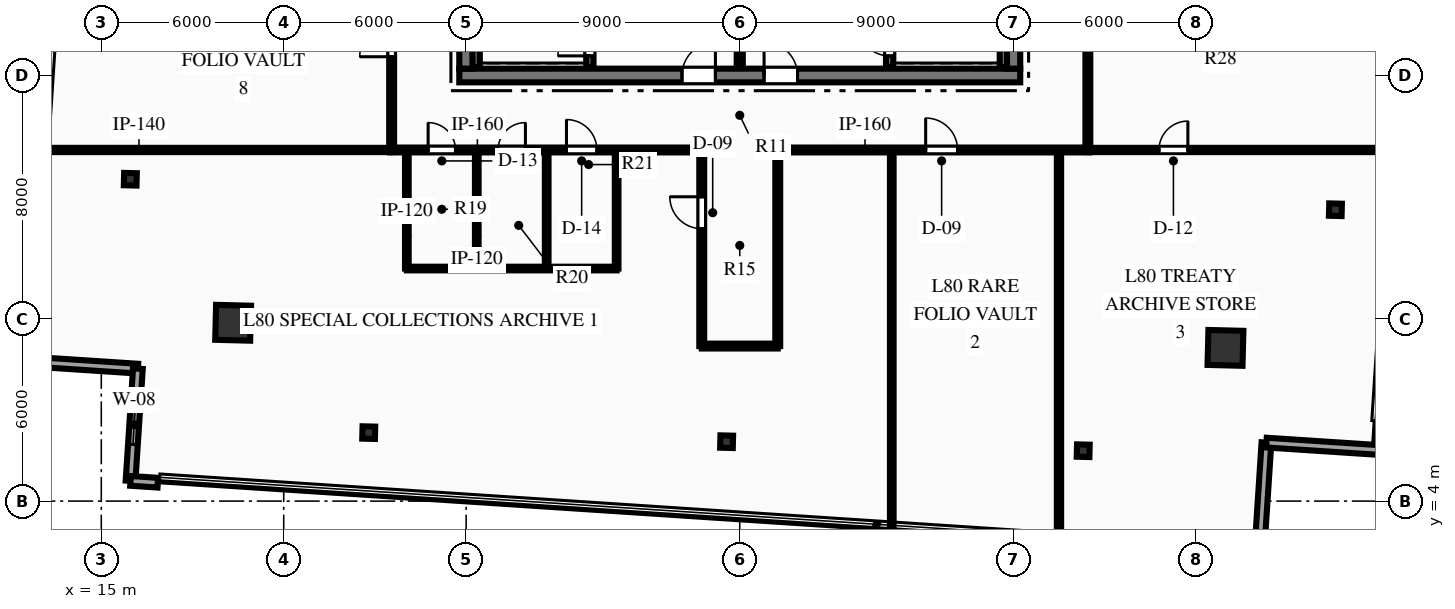
"""IFC4 building model, lengths in metres.
Left out: names, types, materials, properties, quantities, classifications, styles, units other than length and angle.
Written with IfcOpenShell. Run it as: python <this file> out.ifc"""

import sys

from ifc_helpers import new_model, si_unit, direction, frame, frame_2d, origin, origin_2d, place, context, subcontext, project, spatial, rectangle, hollow_rectangle, i_section, extrude, element, fill, save


model = new_model("IFC4")
c1 = context("Model", 3, precision=1e-05, world=origin(), true_north=direction((0.0, 1.0)))
c2 = subcontext(c1, "Body", "Model", "MODEL_VIEW")
j1 = project(units=[si_unit("LENGTHUNIT", "METRE"), si_unit("PLANEANGLEUNIT", "RADIAN")], contexts=[c1])
p1 = place(None, origin())
s1 = spatial("IfcSite", under=j1, at=p1, CompositionType="ELEMENT")
p2 = place(p1, origin())
s2 = spatial("IfcBuilding", under=s1, at=p2, CompositionType="ELEMENT")
p3 = place(p2, frame((0.0, 0.0, 317.7)))
s3 = spatial("IfcBuildingStorey", under=s2, at=p3, CompositionType="ELEMENT", Elevation=317.7)
p4 = place(p3, frame((26.775, 18.0, 0.0), z_axis=(0.0, 0.0, 1.0), x_axis=(1.0, 0.0, 0.0)))
e1 = element("IfcWall", 1, at=p4, inside=s3, PredefinedType="SHEAR", context=c2, shape_type="SweptSolid", body=[
    extrude(rectangle(XDim=18.45, YDim=0.45, at=frame_2d((9.225, 0.0))), origin(), (0.0, 0.0, 1.0), 3.75),
])
p5 = place(p4, frame((7.325, 0.0, 0.0)))
e2 = element("IfcOpeningElement", 2, at=p5, cuts=e1, PredefinedType="OPENING", context=c2, shape_type="SweptSolid", body=[
    extrude(rectangle(XDim=1.1, YDim=2.15, at=frame_2d((0.55, 1.075))), frame((0.0, 0.235, 0.0), z_axis=(0.0, -1.0, 0.0), x_axis=(1.0, 0.0, 0.0)), (0.0, 0.0, 1.0), 0.47),
])
p6 = place(p4, frame((10.025, 0.0, 0.0)))
e3 = element("IfcOpeningElement", 3, at=p6, cuts=e1, PredefinedType="OPENING", context=c2, shape_type="SweptSolid", body=[
    extrude(rectangle(XDim=1.1, YDim=2.15, at=frame_2d((0.55, 1.075))), frame((0.0, 0.235, 0.0), z_axis=(0.0, -1.0, 0.0), x_axis=(1.0, 0.0, 0.0)), (0.0, 0.0, 1.0), 0.47),
])
p7 = place(p3, frame((27.0, 18.225, 0.0), z_axis=(0.0, 0.0, 1.0), x_axis=(0.0, 1.0, 0.0)))
e4 = element("IfcWall", 4, at=p7, inside=s3, PredefinedType="SHEAR", context=c2, shape_type="SweptSolid", body=[
    extrude(rectangle(XDim=15.55, YDim=0.45, at=frame_2d((7.775, 0.0))), origin(), (0.0, 0.0, 1.0), 3.75),
])
p8 = place(p7, frame((10.015, 0.0, 0.0)))
e5 = element("IfcOpeningElement", 5, at=p8, cuts=e4, PredefinedType="OPENING", context=c2, shape_type="SweptSolid", body=[
    extrude(rectangle(XDim=1.4, YDim=2.2, at=frame_2d((0.7, 1.1))), frame((0.0, 0.235, 0.0), z_axis=(0.0, -1.0, 0.0), x_axis=(1.0, 0.0, 0.0)), (0.0, 0.0, 1.0), 0.47),
])
p9 = place(p3, frame((45.0, 18.225, 0.0), z_axis=(0.0, 0.0, 1.0), x_axis=(0.0, 1.0, 0.0)))
e6 = element("IfcWall", 6, at=p9, inside=s3, PredefinedType="SHEAR", context=c2, shape_type="SweptSolid", body=[
    extrude(rectangle(XDim=15.55, YDim=0.45, at=frame_2d((7.775, 0.0))), origin(), (0.0, 0.0, 1.0), 3.75),
])
p10 = place(p9, frame((10.015, 0.0, 0.0)))
e7 = element("IfcOpeningElement", 7, at=p10, cuts=e6, PredefinedType="OPENING", context=c2, shape_type="SweptSolid", body=[
    extrude(rectangle(XDim=1.4, YDim=2.2, at=frame_2d((0.7, 1.1))), frame((0.0, 0.235, 0.0), z_axis=(0.0, -1.0, 0.0), x_axis=(1.0, 0.0, 0.0)), (0.0, 0.0, 1.0), 0.47),
])
p11 = place(p3, frame((31.07, 18.28, 0.0), z_axis=(0.0, 0.0, 1.0), x_axis=(0.0, 1.0, 0.0)))
e8 = element("IfcWall", 8, at=p11, inside=s3, PredefinedType="SHEAR", context=c2, shape_type="SweptSolid", body=[
    extrude(rectangle(XDim=8.26, YDim=0.24, at=frame_2d((4.13, 0.0))), origin(), (0.0, 0.0, 1.0), 3.75),
])
p12 = place(p11, frame((0.365, 0.0, 0.0)))
e9 = element("IfcOpeningElement", 9, at=p12, cuts=e8, PredefinedType="OPENING", context=c2, shape_type="SweptSolid", body=[
    extrude(rectangle(XDim=1.05, YDim=2.15, at=frame_2d((0.525, 1.075))), frame((0.0, 0.13, 0.0), z_axis=(0.0, -1.0, 0.0), x_axis=(1.0, 0.0, 0.0)), (0.0, 0.0, 1.0), 0.26),
])
p13 = place(p3, frame((27.33, 18.28, 0.0), z_axis=(0.0, 0.0, 1.0), x_axis=(0.0, 1.0, 0.0)))
e10 = element("IfcWall", 10, at=p13, inside=s3, PredefinedType="SHEAR", context=c2, shape_type="SweptSolid", body=[
    extrude(rectangle(XDim=8.26, YDim=0.24, at=frame_2d((4.13, 0.0))), origin(), (0.0, 0.0, 1.0), 3.75),
])
p14 = place(p3, frame((40.93, 18.28, 0.0), z_axis=(0.0, 0.0, 1.0), x_axis=(0.0, 1.0, 0.0)))
e11 = element("IfcWall", 11, at=p14, inside=s3, PredefinedType="SHEAR", context=c2, shape_type="SweptSolid", body=[
    extrude(rectangle(XDim=8.26, YDim=0.24, at=frame_2d((4.13, 0.0))), origin(), (0.0, 0.0, 1.0), 3.75),
])
p15 = place(p14, frame((0.365, 0.0, 0.0)))
e12 = element("IfcOpeningElement", 12, at=p15, cuts=e11, PredefinedType="OPENING", context=c2, shape_type="SweptSolid", body=[
    extrude(rectangle(XDim=1.05, YDim=2.15, at=frame_2d((0.525, 1.075))), frame((0.0, 0.13, 0.0), z_axis=(0.0, -1.0, 0.0), x_axis=(1.0, 0.0, 0.0)), (0.0, 0.0, 1.0), 0.26),
])
p16 = place(p3, frame((44.67, 18.28, 0.0), z_axis=(0.0, 0.0, 1.0), x_axis=(0.0, 1.0, 0.0)))
e13 = element("IfcWall", 13, at=p16, inside=s3, PredefinedType="SHEAR", context=c2, shape_type="SweptSolid", body=[
    extrude(rectangle(XDim=8.26, YDim=0.24, at=frame_2d((4.13, 0.0))), origin(), (0.0, 0.0, 1.0), 3.75),
])
for number, where, z_axis, x_axis in (
    (14, (51.976, 9.04, 0.0), (0.0, 0.0, 1.0), (0.025, 1.0, 0.0)),
    (15, (19.336, 9.866, 0.0), (0.0, 0.0, 1.0), (0.025, 1.0, 0.0)),
):
    element("IfcColumn", number, at=place(p3, frame(where, z_axis=z_axis, x_axis=x_axis)), inside=s3, PredefinedType="COLUMN", context=c2, shape_type="SweptSolid", body=[
        extrude(hollow_rectangle(XDim=1.15, YDim=1.15, WallThickness=0.05, at=origin_2d()), origin(), (0.0, 0.0, 1.0), 3.75),
    ])
for number, where, z_axis, x_axis in (
    (16, (55.592, 13.584, 0.0), (0.0, 0.0, 1.0), (0.025, 1.0, 0.0)),
    (17, (15.955, 14.588, 0.0), (0.0, 0.0, 1.0), (0.025, 1.0, 0.0)),
    (18, (23.796, 6.252, 0.0), (0.0, 0.0, 1.0), (0.025, 1.0, 0.0)),
    (19, (35.568, 5.955, 0.0), (0.0, 0.0, 1.0), (0.025, 1.0, 0.0)),
    (20, (47.297, 5.658, 0.0), (0.0, 0.0, 1.0), (0.025, 1.0, 0.0)),
):
    element("IfcColumn", number, at=place(p3, frame(where, z_axis=z_axis, x_axis=x_axis)), inside=s3, PredefinedType="COLUMN", context=c2, shape_type="SweptSolid", body=[
        extrude(i_section(OverallWidth=0.406, OverallDepth=0.416, WebThickness=0.03, FlangeThickness=0.048, at=origin_2d()), origin(), (0.0, 0.0, 1.0), 3.75),
    ])
p17 = place(p3, frame((57.075, 6.58, 0.0), z_axis=(0.0, 0.0, 1.0), x_axis=(-0.065366831665, -0.997861301644, 0.0)))
e21 = element("IfcWall", 21, at=p17, inside=s3, PredefinedType="STANDARD", context=c2, shape_type="SweptSolid", body=[
    extrude(rectangle(XDim=0.9, YDim=0.32, at=frame_2d((0.45, 0.0))), origin(), (0.0, 0.0, 1.0), 3.49),
])
p18 = place(p3, frame((16.204, 8.357, 0.0), z_axis=(0.0, 0.0, 1.0), x_axis=(-0.997855253572, 0.065459093476, 0.0)))
e22 = element("IfcWall", 22, at=p18, inside=s3, PredefinedType="STANDARD", context=c2, shape_type="SweptSolid", body=[
    extrude(rectangle(XDim=3.7, YDim=0.32, at=frame_2d((1.85, 0.0))), origin(), (0.0, 0.0, 1.0), 3.49),
])
p19 = place(p3, frame((15.962, 4.665, 0.0), z_axis=(0.0, 0.0, 1.0), x_axis=(0.065389083196, 0.997859843765, 0.0)))
e23 = element("IfcWall", 23, at=p19, inside=s3, PredefinedType="STANDARD", context=c2, shape_type="SweptSolid", body=[
    extrude(rectangle(XDim=3.7, YDim=0.32, at=frame_2d((1.85, 0.0))), origin(), (0.0, 0.0, 1.0), 3.49),
])
p20 = place(p19, frame((1.2, 0.0, 0.85)))
e24 = element("IfcOpeningElement", 24, at=p20, cuts=e23, PredefinedType="OPENING", context=c2, shape_type="SweptSolid", body=[
    extrude(rectangle(XDim=1.3, YDim=1.9, at=frame_2d((0.65, 0.95))), frame((0.0, 0.17, 0.0), z_axis=(0.0, -1.0, 0.0), x_axis=(1.0, 0.0, 0.0)), (0.0, 0.0, 1.0), 0.34),
])
p21 = place(p3, frame((16.86, 4.606, 0.0), z_axis=(0.0, 0.0, 1.0), x_axis=(-0.997861301644, 0.065366831665, 0.0)))
e25 = element("IfcWall", 25, at=p21, inside=s3, PredefinedType="STANDARD", context=c2, shape_type="SweptSolid", body=[
    extrude(rectangle(XDim=0.9, YDim=0.32, at=frame_2d((0.45, 0.0))), origin(), (0.0, 0.0, 1.0), 3.49),
])
p22 = place(p3, frame((53.324, 5.924, 0.0), z_axis=(0.0, 0.0, 1.0), x_axis=(-0.065454783575, -0.997855536291, 0.0)))
e26 = element("IfcWall", 26, at=p22, inside=s3, PredefinedType="STANDARD", context=c2, shape_type="SweptSolid", body=[
    extrude(rectangle(XDim=3.7, YDim=0.32, at=frame_2d((1.85, 0.0))), origin(), (0.0, 0.0, 1.0), 3.49),
])
p23 = place(p3, frame((57.016, 5.682, 0.0), z_axis=(0.0, 0.0, 1.0), x_axis=(-0.997855253572, 0.065459093476, 0.0)))
e27 = element("IfcWall", 27, at=p23, inside=s3, PredefinedType="STANDARD", context=c2, shape_type="SweptSolid", body=[
    extrude(rectangle(XDim=3.7, YDim=0.32, at=frame_2d((1.85, 0.0))), origin(), (0.0, 0.0, 1.0), 3.49),
])
p24 = place(p3, frame((36.0, 18.28, 0.0), z_axis=(0.0, 0.0, 1.0), x_axis=(0.0, 1.0, 0.0)))
e28 = element("IfcWall", 28, at=p24, inside=s3, PredefinedType="PARTITIONING", context=c2, shape_type="SweptSolid", body=[
    extrude(rectangle(XDim=3.77, YDim=0.2, at=frame_2d((1.885, 0.0))), origin(), (0.0, 0.0, 1.0), 3.49),
])
p25 = place(p3, frame((24.5, 15.55, 0.0), z_axis=(0.0, 0.0, 1.0), x_axis=(1.0, 0.0, 0.0)))
e29 = element("IfcWall", 29, at=p25, inside=s3, PredefinedType="PARTITIONING", context=c2, shape_type="SweptSolid", body=[
    extrude(rectangle(XDim=10.25, YDim=0.16, at=frame_2d((5.125, 0.0))), origin(), (0.0, 0.0, 1.0), 3.49),
])
p26 = place(p25, frame((1.25, 0.0, 0.0)))
e30 = element("IfcOpeningElement", 30, at=p26, cuts=e29, PredefinedType="OPENING", context=c2, shape_type="SweptSolid", body=[
    extrude(rectangle(XDim=0.9, YDim=2.15, at=frame_2d((0.45, 1.075))), frame((0.0, 0.09, 0.0), z_axis=(0.0, -1.0, 0.0), x_axis=(1.0, 0.0, 0.0)), (0.0, 0.0, 1.0), 0.18),
])
p27 = place(p25, frame((3.55, 0.0, 0.0)))
e31 = element("IfcOpeningElement", 31, at=p27, cuts=e29, PredefinedType="OPENING", context=c2, shape_type="SweptSolid", body=[
    extrude(rectangle(XDim=0.9, YDim=2.15, at=frame_2d((0.45, 1.075))), frame((0.0, 0.09, 0.0), z_axis=(0.0, -1.0, 0.0), x_axis=(1.0, 0.0, 0.0)), (0.0, 0.0, 1.0), 0.18),
])
p28 = place(p25, frame((5.8, 0.0, 0.0)))
e32 = element("IfcOpeningElement", 32, at=p28, cuts=e29, PredefinedType="OPENING", context=c2, shape_type="SweptSolid", body=[
    extrude(rectangle(XDim=1.0, YDim=2.15, at=frame_2d((0.5, 1.075))), frame((0.0, 0.09, 0.0), z_axis=(0.0, -1.0, 0.0), x_axis=(1.0, 0.0, 0.0)), (0.0, 0.0, 1.0), 0.18),
])
p29 = place(p3, frame((37.25, 15.55, 0.0), z_axis=(0.0, 0.0, 1.0), x_axis=(1.0, 0.0, 0.0)))
e33 = element("IfcWall", 33, at=p29, inside=s3, PredefinedType="PARTITIONING", context=c2, shape_type="SweptSolid", body=[
    extrude(rectangle(XDim=10.25, YDim=0.16, at=frame_2d((5.125, 0.0))), origin(), (0.0, 0.0, 1.0), 3.49),
])
p30 = place(p29, frame((4.865, 0.0, 0.0)))
e34 = element("IfcOpeningElement", 34, at=p30, cuts=e33, PredefinedType="OPENING", context=c2, shape_type="SweptSolid", body=[
    extrude(rectangle(XDim=1.05, YDim=2.15, at=frame_2d((0.525, 1.075))), frame((0.0, 0.09, 0.0), z_axis=(0.0, -1.0, 0.0), x_axis=(1.0, 0.0, 0.0)), (0.0, 0.0, 1.0), 0.18),
])
p31 = place(p3, frame((24.55, 15.55, 0.0), z_axis=(0.0, 0.0, 1.0), x_axis=(0.0, 1.0, 0.0)))
e35 = element("IfcWall", 35, at=p31, inside=s3, PredefinedType="PARTITIONING", context=c2, shape_type="SweptSolid", body=[
    extrude(rectangle(XDim=9.2, YDim=0.16, at=frame_2d((4.6, 0.0))), origin(), (0.0, 0.0, 1.0), 3.49),
])
p32 = place(p31, frame((3.067, 0.0, 0.0)))
e36 = element("IfcOpeningElement", 36, at=p32, cuts=e35, PredefinedType="OPENING", context=c2, shape_type="SweptSolid", body=[
    extrude(rectangle(XDim=1.05, YDim=2.15, at=frame_2d((0.525, 1.075))), frame((0.0, 0.09, 0.0), z_axis=(0.0, -1.0, 0.0), x_axis=(1.0, 0.0, 0.0)), (0.0, 0.0, 1.0), 0.18),
])
p33 = place(p31, frame((5.23, 0.0, 0.0)))
e37 = element("IfcOpeningElement", 37, at=p33, cuts=e35, PredefinedType="OPENING", context=c2, shape_type="SweptSolid", body=[
    extrude(rectangle(XDim=1.05, YDim=2.15, at=frame_2d((0.525, 1.075))), frame((0.0, 0.09, 0.0), z_axis=(0.0, -1.0, 0.0), x_axis=(1.0, 0.0, 0.0)), (0.0, 0.0, 1.0), 0.18),
])
p34 = place(p3, frame((47.45, 15.55, 0.0), z_axis=(0.0, 0.0, 1.0), x_axis=(0.0, 1.0, 0.0)))
e38 = element("IfcWall", 38, at=p34, inside=s3, PredefinedType="PARTITIONING", context=c2, shape_type="SweptSolid", body=[
    extrude(rectangle(XDim=9.2, YDim=0.16, at=frame_2d((4.6, 0.0))), origin(), (0.0, 0.0, 1.0), 3.49),
])
p35 = place(p34, frame((3.747, 0.0, 0.0)))
e39 = element("IfcOpeningElement", 39, at=p35, cuts=e38, PredefinedType="OPENING", context=c2, shape_type="SweptSolid", body=[
    extrude(rectangle(XDim=1.05, YDim=2.15, at=frame_2d((0.525, 1.075))), frame((0.0, 0.09, 0.0), z_axis=(0.0, -1.0, 0.0), x_axis=(1.0, 0.0, 0.0)), (0.0, 0.0, 1.0), 0.18),
])
p36 = place(p3, frame((34.75, 9.1, 0.0), z_axis=(0.0, 0.0, 1.0), x_axis=(0.0, 1.0, 0.0)))
e40 = element("IfcWall", 40, at=p36, inside=s3, PredefinedType="PARTITIONING", context=c2, shape_type="SweptSolid", body=[
    extrude(rectangle(XDim=6.45, YDim=0.16, at=frame_2d((3.225, 0.0))), origin(), (0.0, 0.0, 1.0), 3.49),
])
p37 = place(p36, frame((3.861, 0.0, 0.0)))
e41 = element("IfcOpeningElement", 41, at=p37, cuts=e40, PredefinedType="OPENING", context=c2, shape_type="SweptSolid", body=[
    extrude(rectangle(XDim=1.05, YDim=2.15, at=frame_2d((0.525, 1.075))), frame((0.0, 0.09, 0.0), z_axis=(0.0, -1.0, 0.0), x_axis=(1.0, 0.0, 0.0)), (0.0, 0.0, 1.0), 0.18),
])
p38 = place(p3, frame((37.25, 9.1, 0.0), z_axis=(0.0, 0.0, 1.0), x_axis=(0.0, 1.0, 0.0)))
e42 = element("IfcWall", 42, at=p38, inside=s3, PredefinedType="PARTITIONING", context=c2, shape_type="SweptSolid", body=[
    extrude(rectangle(XDim=6.45, YDim=0.16, at=frame_2d((3.225, 0.0))), origin(), (0.0, 0.0, 1.0), 3.49),
])
p39 = place(p3, frame((34.75, 9.1, 0.0), z_axis=(0.0, 0.0, 1.0), x_axis=(1.0, 0.0, 0.0)))
e43 = element("IfcWall", 43, at=p39, inside=s3, PredefinedType="PARTITIONING", context=c2, shape_type="SweptSolid", body=[
    extrude(rectangle(XDim=2.5, YDim=0.16, at=frame_2d((1.25, 0.0))), origin(), (0.0, 0.0, 1.0), 3.49),
])
p40 = place(p3, frame((25.05, 11.65, 0.0), z_axis=(0.0, 0.0, 1.0), x_axis=(0.0, 1.0, 0.0)))
e44 = element("IfcWall", 44, at=p40, inside=s3, PredefinedType="PARTITIONING", context=c2, shape_type="SweptSolid", body=[
    extrude(rectangle(XDim=3.9, YDim=0.12, at=frame_2d((1.95, 0.0))), origin(), (0.0, 0.0, 1.0), 2.868),
])
for number, where, z_axis, x_axis in (
    (45, (27.35, 11.65, 0.0), (0.0, 0.0, 1.0), (0.0, 1.0, 0.0)),
    (46, (29.65, 11.65, 0.0), (0.0, 0.0, 1.0), (0.0, 1.0, 0.0)),
    (47, (31.95, 11.65, 0.0), (0.0, 0.0, 1.0), (0.0, 1.0, 0.0)),
):
    element("IfcWall", number, at=place(p3, frame(where, z_axis=z_axis, x_axis=x_axis)), inside=s3, PredefinedType="PARTITIONING", context=c2, shape_type="SweptSolid", body=[
        extrude(rectangle(XDim=3.9, YDim=0.12, at=frame_2d((1.95, 0.0))), origin(), (0.0, 0.0, 1.0), 3.49),
    ])
p41 = place(p3, frame((25.05, 11.65, 0.0), z_axis=(0.0, 0.0, 1.0), x_axis=(1.0, 0.0, 0.0)))
e48 = element("IfcWall", 48, at=p41, inside=s3, PredefinedType="PARTITIONING", context=c2, shape_type="SweptSolid", body=[
    extrude(rectangle(XDim=6.9, YDim=0.12, at=frame_2d((3.45, 0.0))), origin(), (0.0, 0.0, 1.0), 3.49),
])
p42 = place(p3, frame((13.007, 15.55, 0.0), z_axis=(0.0, 0.0, 1.0), x_axis=(1.0, 0.0, 0.0)))
e49 = element("IfcWall", 49, at=p42, inside=s3, PredefinedType="PARTITIONING", context=c2, shape_type="SweptSolid", body=[
    extrude(rectangle(XDim=11.543, YDim=0.14, at=frame_2d((5.771, 0.0))), origin(), (0.0, 0.0, 1.0), 2.868),
])
p43 = place(p3, frame((47.45, 15.55, 0.0), z_axis=(0.0, 0.0, 1.0), x_axis=(1.0, 0.0, 0.0)))
e50 = element("IfcWall", 50, at=p43, inside=s3, PredefinedType="PARTITIONING", context=c2, shape_type="SweptSolid", body=[
    extrude(rectangle(XDim=10.173, YDim=0.14, at=frame_2d((5.086, 0.0))), origin(), (0.0, 0.0, 1.0), 2.868),
])
p44 = place(p43, frame((2.339, 0.0, 0.0)))
e51 = element("IfcOpeningElement", 51, at=p44, cuts=e50, PredefinedType="OPENING", context=c2, shape_type="SweptSolid", body=[
    extrude(rectangle(XDim=0.95, YDim=2.15, at=frame_2d((0.475, 1.075))), frame((0.0, 0.08, 0.0), z_axis=(0.0, -1.0, 0.0), x_axis=(1.0, 0.0, 0.0)), (0.0, 0.0, 1.0), 0.16),
])
p45 = place(p3, frame((41.0, 3.064, 0.0), z_axis=(0.0, 0.0, 1.0), x_axis=(0.0, 1.0, 0.0)))
e52 = element("IfcWall", 52, at=p45, inside=s3, PredefinedType="PARTITIONING", context=c2, shape_type="SweptSolid", body=[
    extrude(rectangle(XDim=12.486, YDim=0.12, at=frame_2d((6.243, 0.0))), origin(), (0.0, 0.0, 1.0), 3.49),
])
p46 = place(p3, frame((46.5, 2.703, 0.0), z_axis=(0.0, 0.0, 1.0), x_axis=(0.0, 1.0, 0.0)))
e53 = element("IfcWall", 53, at=p46, inside=s3, PredefinedType="PARTITIONING", context=c2, shape_type="SweptSolid", body=[
    extrude(rectangle(XDim=12.847, YDim=0.14, at=frame_2d((6.423, 0.0))), origin(), (0.0, 0.0, 1.0), 2.868),
])
p47 = place(p20, origin())
e54 = element("IfcWindow", 54, at=p47, inside=s3, PartitioningType="SINGLE_PANEL", PredefinedType="WINDOW", context=c2, shape_type="SweptSolid", body=[
    extrude(rectangle(XDim=1.3, YDim=1.9, at=frame_2d((0.65, 0.95))), frame((0.0, 0.03, 0.0), z_axis=(0.0, -1.0, 0.0), x_axis=(1.0, 0.0, 0.0)), (0.0, 0.0, 1.0), 0.06),
])
fill(e24, e54)
p48 = place(p12, origin())
e55 = element("IfcDoor", 55, at=p48, inside=s3, OperationType="SINGLE_SWING_LEFT", PredefinedType="DOOR", context=c2, shape_type="SweptSolid", body=[
    extrude(rectangle(XDim=1.05, YDim=2.15, at=frame_2d((0.525, 1.075))), frame((0.0, 0.025, 0.0), z_axis=(0.0, -1.0, 0.0), x_axis=(1.0, 0.0, 0.0)), (0.0, 0.0, 1.0), 0.05),
])
fill(e9, e55)
p49 = place(p15, origin())
e56 = element("IfcDoor", 56, at=p49, inside=s3, OperationType="SINGLE_SWING_RIGHT", PredefinedType="DOOR", context=c2, shape_type="SweptSolid", body=[
    extrude(rectangle(XDim=1.05, YDim=2.15, at=frame_2d((0.525, 1.075))), frame((0.0, 0.025, 0.0), z_axis=(0.0, -1.0, 0.0), x_axis=(1.0, 0.0, 0.0)), (0.0, 0.0, 1.0), 0.05),
])
fill(e12, e56)
p50 = place(p5, origin())
e57 = element("IfcDoor", 57, at=p50, inside=s3, OperationType="SINGLE_SWING_RIGHT", PredefinedType="DOOR", context=c2, shape_type="SweptSolid", body=[
    extrude(rectangle(XDim=1.1, YDim=2.15, at=frame_2d((0.55, 1.075))), frame((0.0, 0.025, 0.0), z_axis=(0.0, -1.0, 0.0), x_axis=(1.0, 0.0, 0.0)), (0.0, 0.0, 1.0), 0.05),
])
fill(e2, e57)
p51 = place(p6, origin())
e58 = element("IfcDoor", 58, at=p51, inside=s3, OperationType="SINGLE_SWING_LEFT", PredefinedType="DOOR", context=c2, shape_type="SweptSolid", body=[
    extrude(rectangle(XDim=1.1, YDim=2.15, at=frame_2d((0.55, 1.075))), frame((0.0, 0.025, 0.0), z_axis=(0.0, -1.0, 0.0), x_axis=(1.0, 0.0, 0.0)), (0.0, 0.0, 1.0), 0.05),
])
fill(e3, e58)
p52 = place(p26, origin())
e59 = element("IfcDoor", 59, at=p52, inside=s3, OperationType="SINGLE_SWING_LEFT", PredefinedType="DOOR", context=c2, shape_type="SweptSolid", body=[
    extrude(rectangle(XDim=0.9, YDim=2.15, at=frame_2d((0.45, 1.075))), frame((0.0, 0.025, 0.0), z_axis=(0.0, -1.0, 0.0), x_axis=(1.0, 0.0, 0.0)), (0.0, 0.0, 1.0), 0.05),
])
fill(e30, e59)
p53 = place(p27, origin())
e60 = element("IfcDoor", 60, at=p53, inside=s3, OperationType="SINGLE_SWING_RIGHT", PredefinedType="DOOR", context=c2, shape_type="SweptSolid", body=[
    extrude(rectangle(XDim=0.9, YDim=2.15, at=frame_2d((0.45, 1.075))), frame((0.0, 0.025, 0.0), z_axis=(0.0, -1.0, 0.0), x_axis=(1.0, 0.0, 0.0)), (0.0, 0.0, 1.0), 0.05),
])
fill(e31, e60)
p54 = place(p28, origin())
e61 = element("IfcDoor", 61, at=p54, inside=s3, OperationType="SINGLE_SWING_LEFT", PredefinedType="DOOR", context=c2, shape_type="SweptSolid", body=[
    extrude(rectangle(XDim=1.0, YDim=2.15, at=frame_2d((0.5, 1.075))), frame((0.0, 0.025, 0.0), z_axis=(0.0, -1.0, 0.0), x_axis=(1.0, 0.0, 0.0)), (0.0, 0.0, 1.0), 0.05),
])
fill(e32, e61)
p55 = place(p37, origin())
e62 = element("IfcDoor", 62, at=p55, inside=s3, OperationType="SINGLE_SWING_RIGHT", PredefinedType="DOOR", context=c2, shape_type="SweptSolid", body=[
    extrude(rectangle(XDim=1.05, YDim=2.15, at=frame_2d((0.525, 1.075))), frame((0.0, 0.025, 0.0), z_axis=(0.0, -1.0, 0.0), x_axis=(1.0, 0.0, 0.0)), (0.0, 0.0, 1.0), 0.05),
])
fill(e41, e62)
p56 = place(p30, origin())
e63 = element("IfcDoor", 63, at=p56, inside=s3, OperationType="SINGLE_SWING_LEFT", PredefinedType="DOOR", context=c2, shape_type="SweptSolid", body=[
    extrude(rectangle(XDim=1.05, YDim=2.15, at=frame_2d((0.525, 1.075))), frame((0.0, 0.025, 0.0), z_axis=(0.0, -1.0, 0.0), x_axis=(1.0, 0.0, 0.0)), (0.0, 0.0, 1.0), 0.05),
])
fill(e34, e63)
p57 = place(p44, origin())
e64 = element("IfcDoor", 64, at=p57, inside=s3, OperationType="SINGLE_SWING_RIGHT", PredefinedType="DOOR", context=c2, shape_type="SweptSolid", body=[
    extrude(rectangle(XDim=0.95, YDim=2.15, at=frame_2d((0.475, 1.075))), frame((0.0, 0.025, 0.0), z_axis=(0.0, -1.0, 0.0), x_axis=(1.0, 0.0, 0.0)), (0.0, 0.0, 1.0), 0.05),
])
fill(e51, e64)
p58 = place(p32, origin())
e65 = element("IfcDoor", 65, at=p58, inside=s3, OperationType="SINGLE_SWING_LEFT", PredefinedType="DOOR", context=c2, shape_type="SweptSolid", body=[
    extrude(rectangle(XDim=1.05, YDim=2.15, at=frame_2d((0.525, 1.075))), frame((0.0, 0.025, 0.0), z_axis=(0.0, -1.0, 0.0), x_axis=(1.0, 0.0, 0.0)), (0.0, 0.0, 1.0), 0.05),
])
fill(e36, e65)
save(model, sys.argv[1])
